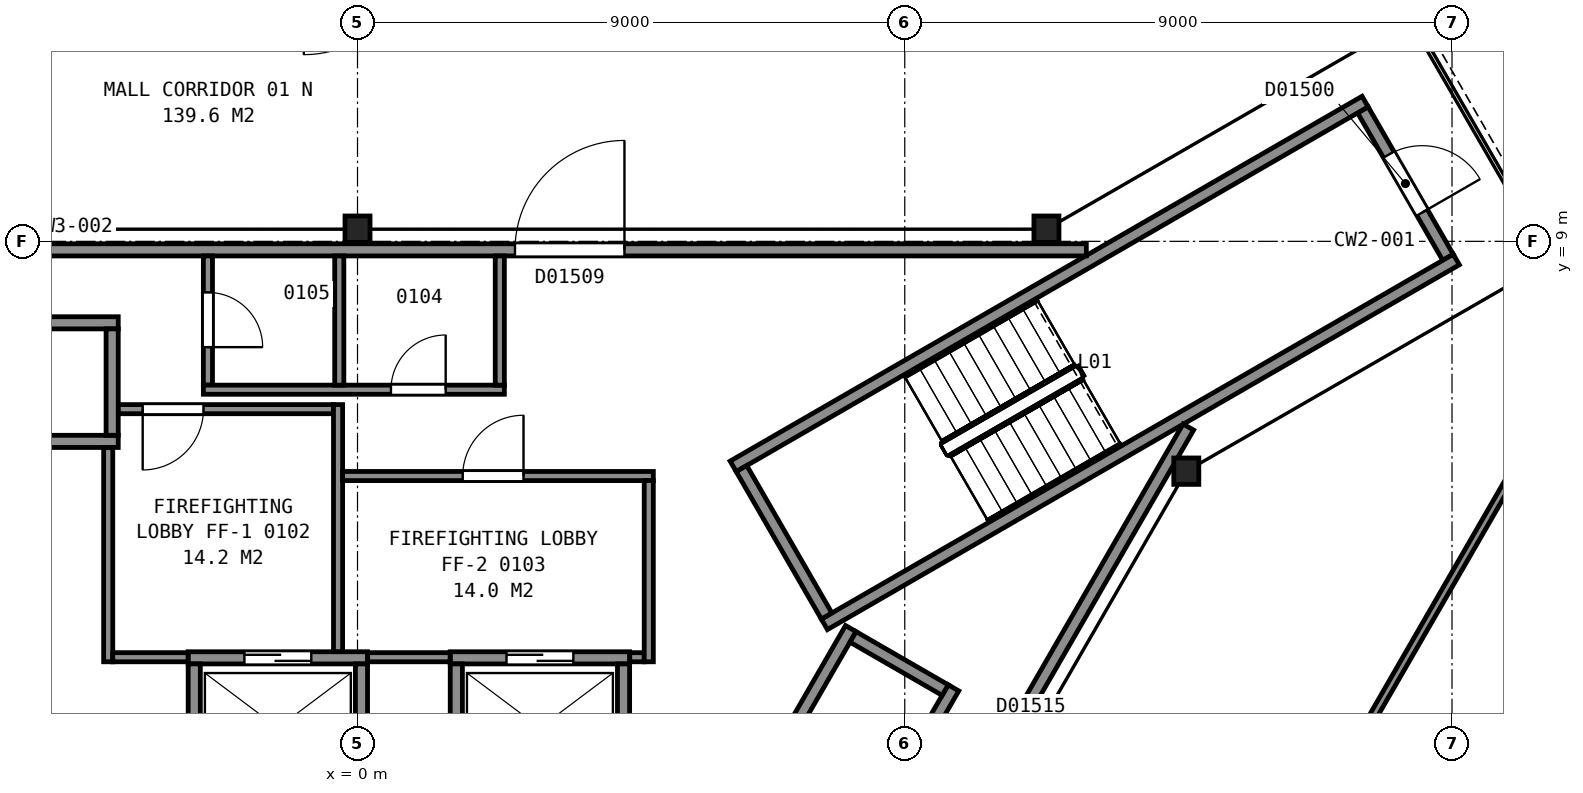
"""IFC4 building model, lengths in metres.
Left out: names, types, materials, properties, quantities, classifications, styles, units other than length and angle.
Written with IfcOpenShell. Run it as: python <this file> out.ifc"""

import sys

from ifc_helpers import new_model, si_unit, direction, frame, frame_2d, origin, origin_2d, place, context, subcontext, project, spatial, rectangle, i_section, extrude, element, fill, save


model = new_model("IFC4")
c1 = context("Model", 3, precision=1e-05, world=origin(), true_north=direction((0.0, 1.0)))
c2 = subcontext(c1, "Body", "Model", "MODEL_VIEW")
j1 = project(units=[si_unit("LENGTHUNIT", "METRE"), si_unit("PLANEANGLEUNIT", "RADIAN")], contexts=[c1])
p1 = place(None, origin())
s1 = spatial("IfcSite", under=j1, at=p1, CompositionType="ELEMENT")
p2 = place(p1, origin())
s2 = spatial("IfcBuilding", under=s1, at=p2, CompositionType="ELEMENT")
p3 = place(p2, frame((0.0, 0.0, 12.0)))
s3 = spatial("IfcBuildingStorey", under=s2, at=p3, CompositionType="ELEMENT", Elevation=12.0)
for number, where, z_axis, x_axis in (
    (1, (13.63, 5.22, 0.0), (0.0, 0.0, 1.0), (1.0, 0.0, 0.0)),
    (2, (11.33, 9.2, 0.0), (0.0, 0.0, 1.0), (1.0, 0.0, 0.0)),
    (3, (0.0, 9.2, 0.0), (0.0, 0.0, 1.0), (1.0, 0.0, 0.0)),
):
    element("IfcColumn", number, at=place(p3, frame(where, z_axis=z_axis, x_axis=x_axis)), inside=s3, PredefinedType="COLUMN", context=c2, shape_type="SweptSolid", body=[
        extrude(i_section(OverallWidth=0.411, OverallDepth=0.434, WebThickness=0.036, FlangeThickness=0.057, FilletRadius=0.015, at=origin_2d()), origin(), (0.0, 0.0, 1.0), 5.4),
    ])
p4 = place(p3, frame((17.934, 8.738, 0.0), z_axis=(0.0, 0.0, 1.0), x_axis=(-0.49998411664, 0.866034573852, 0.0)))
e4 = element("IfcWall", 4, at=p4, inside=s3, PredefinedType="PARTITIONING", context=c2, shape_type="SweptSolid", body=[
    extrude(rectangle(XDim=2.8, YDim=0.2, at=frame_2d((1.4, 0.0))), origin(), (0.0, 0.0, 1.0), 5.15),
])
p5 = place(p4, frame((0.85, 0.0, 0.0)))
e5 = element("IfcOpeningElement", 5, at=p5, cuts=e4, PredefinedType="OPENING", context=c2, shape_type="SweptSolid", body=[
    extrude(rectangle(XDim=1.1, YDim=2.1, at=frame_2d((0.55, 1.05))), frame((0.0, 0.11, 0.0), z_axis=(0.0, -1.0, 0.0), x_axis=(1.0, 0.0, 0.0)), (0.0, 0.0, 1.0), 0.22),
])
for number, where, z_axis, x_axis in (
    (6, (6.178, 5.299, 0.0), (0.0, 0.0, 1.0), (0.866, 0.5, 0.0)),
    (7, (7.678, 2.701, 0.0), (0.0, 0.0, 1.0), (0.866, 0.5, 0.0)),
):
    element("IfcWall", number, at=place(p3, frame(where, z_axis=z_axis, x_axis=x_axis)), inside=s3, PredefinedType="PARTITIONING", context=c2, shape_type="SweptSolid", body=[
        extrude(rectangle(XDim=12.0, YDim=0.2, at=frame_2d((6.0, 0.0))), origin(), (0.0, 0.0, 1.0), 5.15),
    ])
p6 = place(p3, frame((7.715, 2.838, 0.0), z_axis=(0.0, 0.0, 1.0), x_axis=(-0.500049511043, 0.865996816683, 0.0)))
e8 = element("IfcWall", 8, at=p6, inside=s3, PredefinedType="PARTITIONING", context=c2, shape_type="SweptSolid", body=[
    extrude(rectangle(XDim=2.8, YDim=0.2, at=frame_2d((1.4, 0.0))), origin(), (0.0, 0.0, 1.0), 5.15),
])
p7 = place(p3, frame((-2.785, 2.15, 0.0), z_axis=(0.0, 0.0, 1.0), x_axis=(1.0, 0.0, 0.0)))
e9 = element("IfcWall", 9, at=p7, inside=s3, PredefinedType="PARTITIONING", context=c2, shape_type="SweptSolid", body=[
    extrude(rectangle(XDim=2.95, YDim=0.2, at=frame_2d((1.475, 0.0))), origin(), (0.0, 0.0, 1.0), 5.4),
])
p8 = place(p7, frame((0.925, 0.0, 0.0)))
e10 = element("IfcOpeningElement", 10, at=p8, cuts=e9, PredefinedType="OPENING", context=c2, shape_type="SweptSolid", body=[
    extrude(rectangle(XDim=1.1, YDim=2.1, at=frame_2d((0.55, 1.05))), frame((0.0, 0.11, 0.0), z_axis=(0.0, -1.0, 0.0), x_axis=(1.0, 0.0, 0.0)), (0.0, 0.0, 1.0), 0.22),
])
p9 = place(p3, frame((1.525, 2.15, 0.0), z_axis=(0.0, 0.0, 1.0), x_axis=(1.0, 0.0, 0.0)))
e11 = element("IfcWall", 11, at=p9, inside=s3, PredefinedType="PARTITIONING", context=c2, shape_type="SweptSolid", body=[
    extrude(rectangle(XDim=2.95, YDim=0.2, at=frame_2d((1.475, 0.0))), origin(), (0.0, 0.0, 1.0), 5.4),
])
p10 = place(p9, frame((0.925, 0.0, 0.0)))
e12 = element("IfcOpeningElement", 12, at=p10, cuts=e11, PredefinedType="OPENING", context=c2, shape_type="SweptSolid", body=[
    extrude(rectangle(XDim=1.1, YDim=2.1, at=frame_2d((0.55, 1.05))), frame((0.0, 0.11, 0.0), z_axis=(0.0, -1.0, 0.0), x_axis=(1.0, 0.0, 0.0)), (0.0, 0.0, 1.0), 0.22),
])
for number, where, z_axis, x_axis in (
    (13, (-6.285, 5.71, 0.0), (0.0, 0.0, 1.0), (1.0, 0.0, 0.0)),
    (14, (-6.285, 7.66, 0.0), (0.0, 0.0, 1.0), (1.0, 0.0, 0.0)),
):
    element("IfcWall", number, at=place(p3, frame(where, z_axis=z_axis, x_axis=x_axis)), inside=s3, PredefinedType="PARTITIONING", context=c2, shape_type="SweptSolid", body=[
        extrude(rectangle(XDim=2.35, YDim=0.2, at=frame_2d((1.175, 0.0))), origin(), (0.0, 0.0, 1.0), 5.4),
    ])
p11 = place(p3, frame((7.351, -2.587, 0.0), z_axis=(0.0, 0.0, 1.0), x_axis=(0.500002801628, 0.866023786258, 0.0)))
e15 = element("IfcWall", 15, at=p11, inside=s3, PredefinedType="PARTITIONING", context=c2, shape_type="SweptSolid", body=[
    extrude(rectangle(XDim=4.9, YDim=0.2, at=frame_2d((2.45, 0.0))), origin(), (0.0, 0.0, 1.0), 5.4),
])
p12 = place(p3, frame((5.663, -1.612, 0.0), z_axis=(0.0, 0.0, 1.0), x_axis=(0.49998122708, 0.866036242063, 0.0)))
e16 = element("IfcWall", 16, at=p12, inside=s3, PredefinedType="PARTITIONING", context=c2, shape_type="SweptSolid", body=[
    extrude(rectangle(XDim=4.9, YDim=0.2, at=frame_2d((2.45, 0.0))), origin(), (0.0, 0.0, 1.0), 5.4),
])
for number, where, z_axis, x_axis in (
    (17, (4.375, 0.1, 0.0), (0.0, 0.0, 1.0), (0.0, 1.0, 0.0)),
    (18, (1.625, 0.1, 0.0), (0.0, 0.0, 1.0), (0.0, 1.0, 0.0)),
    (19, (0.065, 0.1, 0.0), (0.0, 0.0, 1.0), (0.0, 1.0, 0.0)),
    (20, (-2.685, 0.1, 0.0), (0.0, 0.0, 1.0), (0.0, 1.0, 0.0)),
):
    element("IfcWall", number, at=place(p3, frame(where, z_axis=z_axis, x_axis=x_axis)), inside=s3, PredefinedType="PARTITIONING", context=c2, shape_type="SweptSolid", body=[
        extrude(rectangle(XDim=1.95, YDim=0.2, at=frame_2d((0.975, 0.0))), origin(), (0.0, 0.0, 1.0), 5.4),
    ])
p13 = place(p3, frame((-4.035, 5.81, 0.0), z_axis=(0.0, 0.0, 1.0), x_axis=(0.0, 1.0, 0.0)))
e21 = element("IfcWall", 21, at=p13, inside=s3, PredefinedType="PARTITIONING", context=c2, shape_type="SweptSolid", body=[
    extrude(rectangle(XDim=1.75, YDim=0.2, at=frame_2d((0.875, 0.0))), origin(), (0.0, 0.0, 1.0), 5.4),
])
p14 = place(p3, frame((9.665, 1.62, 0.0), z_axis=(0.0, 0.0, 1.0), x_axis=(-0.866002029911, 0.500040482552, 0.0)))
e22 = element("IfcWall", 22, at=p14, inside=s3, PredefinedType="PARTITIONING", context=c2, shape_type="SweptSolid", body=[
    extrude(rectangle(XDim=1.75, YDim=0.2, at=frame_2d((0.875, 0.0))), origin(), (0.0, 0.0, 1.0), 5.4),
])
p15 = place(p3, frame((11.986, 8.86, 0.0), z_axis=(0.0, 0.0, 1.0), x_axis=(-1.0, 0.0, 0.0)))
e23 = element("IfcWall", 23, at=p15, inside=s3, PredefinedType="PARTITIONING", context=c2, shape_type="SweptSolid", body=[
    extrude(rectangle(XDim=23.967, YDim=0.2, at=frame_2d((11.983, 0.0))), origin(), (0.0, 0.0, 1.0), 5.15),
])
p16 = place(p15, frame((7.596, 0.0, 0.0)))
e24 = element("IfcOpeningElement", 24, at=p16, cuts=e23, PredefinedType="OPENING", context=c2, shape_type="SweptSolid", body=[
    extrude(rectangle(XDim=1.8, YDim=2.1, at=frame_2d((0.9, 1.05))), frame((0.0, 0.11, 0.0), z_axis=(0.0, -1.0, 0.0), x_axis=(1.0, 0.0, 0.0)), (0.0, 0.0, 1.0), 0.22),
])
p17 = place(p3, frame((-4.1, 2.085, 0.0), z_axis=(0.0, 0.0, 1.0), x_axis=(0.0, 1.0, 0.0)))
e25 = element("IfcWall", 25, at=p17, inside=s3, PredefinedType="PARTITIONING", context=c2, shape_type="SweptSolid", body=[
    extrude(rectangle(XDim=3.523, YDim=0.15, at=frame_2d((1.761, 0.0))), origin(), (0.0, 0.0, 1.0), 5.15),
])
p18 = place(p3, frame((-4.025, 2.16, 0.0), z_axis=(0.0, 0.0, 1.0), x_axis=(1.0, 0.0, 0.0)))
e26 = element("IfcWall", 26, at=p18, inside=s3, PredefinedType="PARTITIONING", context=c2, shape_type="SweptSolid", body=[
    extrude(rectangle(XDim=1.238, YDim=0.15, at=frame_2d((0.619, 0.0))), origin(), (0.0, 0.0, 1.0), 5.15),
])
p19 = place(p3, frame((-3.933, 6.24, 0.0), z_axis=(0.0, 0.0, 1.0), x_axis=(1.0, 0.0, 0.0)))
e27 = element("IfcWall", 27, at=p19, inside=s3, PredefinedType="PARTITIONING", context=c2, shape_type="SweptSolid", body=[
    extrude(rectangle(XDim=3.538, YDim=0.15, at=frame_2d((1.769, 0.0))), origin(), (0.0, 0.0, 1.0), 5.15),
])
p20 = place(p19, frame((0.4, 0.0, 0.0)))
e28 = element("IfcOpeningElement", 28, at=p20, cuts=e27, PredefinedType="OPENING", context=c2, shape_type="SweptSolid", body=[
    extrude(rectangle(XDim=1.0, YDim=2.1, at=frame_2d((0.5, 1.05))), frame((0.0, 0.085, 0.0), z_axis=(0.0, -1.0, 0.0), x_axis=(1.0, 0.0, 0.0)), (0.0, 0.0, 1.0), 0.17),
])
p21 = place(p3, frame((-2.46, 8.76, 0.0), z_axis=(0.0, 0.0, 1.0), x_axis=(0.0, -1.0, 0.0)))
e29 = element("IfcWall", 29, at=p21, inside=s3, PredefinedType="PARTITIONING", context=c2, shape_type="SweptSolid", body=[
    extrude(rectangle(XDim=2.125, YDim=0.15, at=frame_2d((1.062, 0.0))), origin(), (0.0, 0.0, 1.0), 5.15),
])
p22 = place(p21, frame((0.6, 0.0, 0.0)))
e30 = element("IfcOpeningElement", 30, at=p22, cuts=e29, PredefinedType="OPENING", context=c2, shape_type="SweptSolid", body=[
    extrude(rectangle(XDim=0.9, YDim=2.1, at=frame_2d((0.45, 1.05))), frame((0.0, 0.085, 0.0), z_axis=(0.0, -1.0, 0.0), x_axis=(1.0, 0.0, 0.0)), (0.0, 0.0, 1.0), 0.17),
])
p23 = place(p3, frame((-2.535, 6.56, 0.0), z_axis=(0.0, 0.0, 1.0), x_axis=(1.0, 0.0, 0.0)))
e31 = element("IfcWall", 31, at=p23, inside=s3, PredefinedType="PARTITIONING", context=c2, shape_type="SweptSolid", body=[
    extrude(rectangle(XDim=4.95, YDim=0.15, at=frame_2d((2.475, 0.0))), origin(), (0.0, 0.0, 1.0), 5.15),
])
p24 = place(p23, frame((3.085, 0.0, 0.0)))
e32 = element("IfcOpeningElement", 32, at=p24, cuts=e31, PredefinedType="OPENING", context=c2, shape_type="SweptSolid", body=[
    extrude(rectangle(XDim=0.9, YDim=2.1, at=frame_2d((0.45, 1.05))), frame((0.0, 0.085, 0.0), z_axis=(0.0, -1.0, 0.0), x_axis=(1.0, 0.0, 0.0)), (0.0, 0.0, 1.0), 0.17),
])
p25 = place(p3, frame((-0.32, 2.252, 0.0), z_axis=(0.0, 0.0, 1.0), x_axis=(0.0, 1.0, 0.0)))
e33 = element("IfcWall", 33, at=p25, inside=s3, PredefinedType="PARTITIONING", context=c2, shape_type="SweptSolid", body=[
    extrude(rectangle(XDim=4.063, YDim=0.15, at=frame_2d((2.031, 0.0))), origin(), (0.0, 0.0, 1.0), 5.15),
])
p26 = place(p3, frame((-0.245, 5.14, 0.0), z_axis=(0.0, 0.0, 1.0), x_axis=(1.0, 0.0, 0.0)))
e34 = element("IfcWall", 34, at=p26, inside=s3, PredefinedType="PARTITIONING", context=c2, shape_type="SweptSolid", body=[
    extrude(rectangle(XDim=5.11, YDim=0.15, at=frame_2d((2.555, 0.0))), origin(), (0.0, 0.0, 1.0), 5.15),
])
p27 = place(p26, frame((1.975, 0.0, 0.0)))
e35 = element("IfcOpeningElement", 35, at=p27, cuts=e34, PredefinedType="OPENING", context=c2, shape_type="SweptSolid", body=[
    extrude(rectangle(XDim=1.0, YDim=2.1, at=frame_2d((0.5, 1.05))), frame((0.0, 0.085, 0.0), z_axis=(0.0, -1.0, 0.0), x_axis=(1.0, 0.0, 0.0)), (0.0, 0.0, 1.0), 0.17),
])
p28 = place(p3, frame((-0.3, 6.635, 0.0), z_axis=(0.0, 0.0, 1.0), x_axis=(0.0, 1.0, 0.0)))
e36 = element("IfcWall", 36, at=p28, inside=s3, PredefinedType="PARTITIONING", context=c2, shape_type="SweptSolid", body=[
    extrude(rectangle(XDim=2.125, YDim=0.15, at=frame_2d((1.062, 0.0))), origin(), (0.0, 0.0, 1.0), 5.15),
])
p29 = place(p3, frame((0.167, 2.16, 0.0), z_axis=(0.0, 0.0, 1.0), x_axis=(1.0, 0.0, 0.0)))
e37 = element("IfcWall", 37, at=p29, inside=s3, PredefinedType="PARTITIONING", context=c2, shape_type="SweptSolid", body=[
    extrude(rectangle(XDim=1.356, YDim=0.15, at=frame_2d((0.678, 0.0))), origin(), (0.0, 0.0, 1.0), 5.15),
])
p30 = place(p3, frame((1.68, -14.811, 0.0), z_axis=(0.0, 0.0, 1.0), x_axis=(0.499994327219, 0.866028678941, 0.0)))
e38 = element("IfcWall", 38, at=p30, inside=s3, PredefinedType="PARTITIONING", context=c2, shape_type="SweptSolid", body=[
    extrude(rectangle(XDim=23.968, YDim=0.2, at=frame_2d((11.984, 0.0))), origin(), (0.0, 0.0, 1.0), 5.15),
])
p31 = place(p30, frame((13.44, 0.0, 0.0)))
e39 = element("IfcOpeningElement", 39, at=p31, cuts=e38, PredefinedType="OPENING", context=c2, shape_type="SweptSolid", body=[
    extrude(rectangle(XDim=1.8, YDim=2.1, at=frame_2d((0.9, 1.05))), frame((0.0, 0.11, 0.0), z_axis=(0.0, -1.0, 0.0), x_axis=(1.0, 0.0, 0.0)), (0.0, 0.0, 1.0), 0.22),
])
p32 = place(p3, frame((2.34, 6.635, 0.0), z_axis=(0.0, 0.0, 1.0), x_axis=(0.0, 1.0, 0.0)))
e40 = element("IfcWall", 40, at=p32, inside=s3, PredefinedType="PARTITIONING", context=c2, shape_type="SweptSolid", body=[
    extrude(rectangle(XDim=2.125, YDim=0.15, at=frame_2d((1.062, 0.0))), origin(), (0.0, 0.0, 1.0), 5.15),
])
p33 = place(p3, frame((4.477, 2.16, 0.0), z_axis=(0.0, 0.0, 1.0), x_axis=(1.0, 0.0, 0.0)))
e41 = element("IfcWall", 41, at=p33, inside=s3, PredefinedType="PARTITIONING", context=c2, shape_type="SweptSolid", body=[
    extrude(rectangle(XDim=0.238, YDim=0.15, at=frame_2d((0.119, 0.0))), origin(), (0.0, 0.0, 1.0), 5.15),
])
p34 = place(p3, frame((4.79, 2.085, 0.0), z_axis=(0.0, 0.0, 1.0), x_axis=(0.0, 1.0, 0.0)))
e42 = element("IfcWall", 42, at=p34, inside=s3, PredefinedType="PARTITIONING", context=c2, shape_type="SweptSolid", body=[
    extrude(rectangle(XDim=2.98, YDim=0.15, at=frame_2d((1.49, 0.0))), origin(), (0.0, 0.0, 1.0), 5.15),
])
p35 = place(p3, frame((-4.438, -20.054, 0.0), z_axis=(0.0, 0.0, 1.0), x_axis=(-0.499994028088, 0.866028851642, 0.0)))
e43 = element("IfcWall", 43, at=p35, inside=s3, PredefinedType="PARTITIONING", context=c2, shape_type="SweptSolid", body=[
    extrude(rectangle(XDim=30.297, YDim=0.125, at=frame_2d((15.148, 0.0))), origin(), (0.0, 0.0, 1.0), 4.253),
])
p36 = place(p35, frame((26.285, 0.0, 0.0)))
e44 = element("IfcOpeningElement", 44, at=p36, cuts=e43, PredefinedType="OPENING", context=c2, shape_type="SweptSolid", body=[
    extrude(rectangle(XDim=1.2, YDim=2.1, at=frame_2d((0.6, 1.05))), frame((0.0, 0.073, 0.0), z_axis=(0.0, -1.0, 0.0), x_axis=(1.0, 0.0, 0.0)), (0.0, 0.0, 1.0), 0.145),
])
p37 = place(p35, frame((16.731, 0.0, 0.0)))
e45 = element("IfcOpeningElement", 45, at=p37, cuts=e43, PredefinedType="OPENING", context=c2, shape_type="SweptSolid", body=[
    extrude(rectangle(XDim=1.0, YDim=2.1, at=frame_2d((0.5, 1.05))), frame((0.0, 0.073, 0.0), z_axis=(0.0, -1.0, 0.0), x_axis=(1.0, 0.0, 0.0)), (0.0, 0.0, 1.0), 0.145),
])
p38 = place(p35, frame((8.257, 0.0, 0.0)))
e46 = element("IfcOpeningElement", 46, at=p38, cuts=e43, PredefinedType="OPENING", context=c2, shape_type="SweptSolid", body=[
    extrude(rectangle(XDim=1.2, YDim=2.1, at=frame_2d((0.6, 1.05))), frame((0.0, 0.073, 0.0), z_axis=(0.0, -1.0, 0.0), x_axis=(1.0, 0.0, 0.0)), (0.0, 0.0, 1.0), 0.145),
])
p39 = place(p35, frame((2.916, 0.0, 0.0)))
e47 = element("IfcOpeningElement", 47, at=p39, cuts=e43, PredefinedType="OPENING", context=c2, shape_type="SweptSolid", body=[
    extrude(rectangle(XDim=1.0, YDim=2.1, at=frame_2d((0.5, 1.05))), frame((0.0, 0.073, 0.0), z_axis=(0.0, -1.0, 0.0), x_axis=(1.0, 0.0, 0.0)), (0.0, 0.0, 1.0), 0.145),
])
p40 = place(p3, frame((19.586, 6.184, 0.0), z_axis=(0.0, 0.0, 1.0), x_axis=(-0.499994028088, -0.866028851642, 0.0)))
e48 = element("IfcWall", 48, at=p40, inside=s3, PredefinedType="PARTITIONING", context=c2, shape_type="SweptSolid", body=[
    extrude(rectangle(XDim=30.297, YDim=0.125, at=frame_2d((15.148, 0.0))), origin(), (0.0, 0.0, 1.0), 4.253),
])
p41 = place(p40, frame((26.285, 0.0, 0.0)))
e49 = element("IfcOpeningElement", 49, at=p41, cuts=e48, PredefinedType="OPENING", context=c2, shape_type="SweptSolid", body=[
    extrude(rectangle(XDim=1.2, YDim=2.1, at=frame_2d((0.6, 1.05))), frame((0.0, 0.073, 0.0), z_axis=(0.0, -1.0, 0.0), x_axis=(1.0, 0.0, 0.0)), (0.0, 0.0, 1.0), 0.145),
])
p42 = place(p40, frame((18.732, 0.0, 0.0)))
e50 = element("IfcOpeningElement", 50, at=p42, cuts=e48, PredefinedType="OPENING", context=c2, shape_type="SweptSolid", body=[
    extrude(rectangle(XDim=1.2, YDim=2.1, at=frame_2d((0.6, 1.05))), frame((0.0, 0.073, 0.0), z_axis=(0.0, -1.0, 0.0), x_axis=(1.0, 0.0, 0.0)), (0.0, 0.0, 1.0), 0.145),
])
p43 = place(p5, origin())
e51 = element("IfcDoor", 51, at=p43, inside=s3, OperationType="SINGLE_SWING_LEFT", PredefinedType="DOOR", context=c2, shape_type="SweptSolid", body=[
    extrude(rectangle(XDim=1.1, YDim=2.1, at=frame_2d((0.55, 1.05))), frame((0.0, 0.025, 0.0), z_axis=(0.0, -1.0, 0.0), x_axis=(1.0, 0.0, 0.0)), (0.0, 0.0, 1.0), 0.05),
])
fill(e5, e51)
p44 = place(p8, origin())
e52 = element("IfcDoor", 52, at=p44, inside=s3, OperationType="SLIDING_TO_LEFT", PredefinedType="DOOR", context=c2, shape_type="SweptSolid", body=[
    extrude(rectangle(XDim=1.1, YDim=2.1, at=frame_2d((0.55, 1.05))), frame((0.0, 0.025, 0.0), z_axis=(0.0, -1.0, 0.0), x_axis=(1.0, 0.0, 0.0)), (0.0, 0.0, 1.0), 0.05),
])
fill(e10, e52)
p45 = place(p10, origin())
e53 = element("IfcDoor", 53, at=p45, inside=s3, OperationType="SLIDING_TO_RIGHT", PredefinedType="DOOR", context=c2, shape_type="SweptSolid", body=[
    extrude(rectangle(XDim=1.1, YDim=2.1, at=frame_2d((0.55, 1.05))), frame((0.0, 0.025, 0.0), z_axis=(0.0, -1.0, 0.0), x_axis=(1.0, 0.0, 0.0)), (0.0, 0.0, 1.0), 0.05),
])
fill(e12, e53)
p46 = place(p16, origin())
e54 = element("IfcDoor", 54, at=p46, inside=s3, OperationType="DOUBLE_DOOR_SINGLE_SWING", PredefinedType="DOOR", context=c2, shape_type="SweptSolid", body=[
    extrude(rectangle(XDim=1.8, YDim=2.1, at=frame_2d((0.9, 1.05))), frame((0.0, 0.025, 0.0), z_axis=(0.0, -1.0, 0.0), x_axis=(1.0, 0.0, 0.0)), (0.0, 0.0, 1.0), 0.05),
])
fill(e24, e54)
p47 = place(p20, origin())
e55 = element("IfcDoor", 55, at=p47, inside=s3, OperationType="SINGLE_SWING_LEFT", PredefinedType="DOOR", context=c2, shape_type="SweptSolid", body=[
    extrude(rectangle(XDim=1.0, YDim=2.1, at=frame_2d((0.5, 1.05))), frame((0.0, 0.025, 0.0), z_axis=(0.0, -1.0, 0.0), x_axis=(1.0, 0.0, 0.0)), (0.0, 0.0, 1.0), 0.05),
])
fill(e28, e55)
p48 = place(p22, origin())
e56 = element("IfcDoor", 56, at=p48, inside=s3, OperationType="SINGLE_SWING_RIGHT", PredefinedType="DOOR", context=c2, shape_type="SweptSolid", body=[
    extrude(rectangle(XDim=0.9, YDim=2.1, at=frame_2d((0.45, 1.05))), frame((0.0, 0.025, 0.0), z_axis=(0.0, -1.0, 0.0), x_axis=(1.0, 0.0, 0.0)), (0.0, 0.0, 1.0), 0.05),
])
fill(e30, e56)
p49 = place(p24, origin())
e57 = element("IfcDoor", 57, at=p49, inside=s3, OperationType="SINGLE_SWING_RIGHT", PredefinedType="DOOR", context=c2, shape_type="SweptSolid", body=[
    extrude(rectangle(XDim=0.9, YDim=2.1, at=frame_2d((0.45, 1.05))), frame((0.0, 0.025, 0.0), z_axis=(0.0, -1.0, 0.0), x_axis=(1.0, 0.0, 0.0)), (0.0, 0.0, 1.0), 0.05),
])
fill(e32, e57)
p50 = place(p27, origin())
e58 = element("IfcDoor", 58, at=p50, inside=s3, OperationType="SINGLE_SWING_RIGHT", PredefinedType="DOOR", context=c2, shape_type="SweptSolid", body=[
    extrude(rectangle(XDim=1.0, YDim=2.1, at=frame_2d((0.5, 1.05))), frame((0.0, 0.025, 0.0), z_axis=(0.0, -1.0, 0.0), x_axis=(1.0, 0.0, 0.0)), (0.0, 0.0, 1.0), 0.05),
])
fill(e35, e58)
save(model, sys.argv[1])
